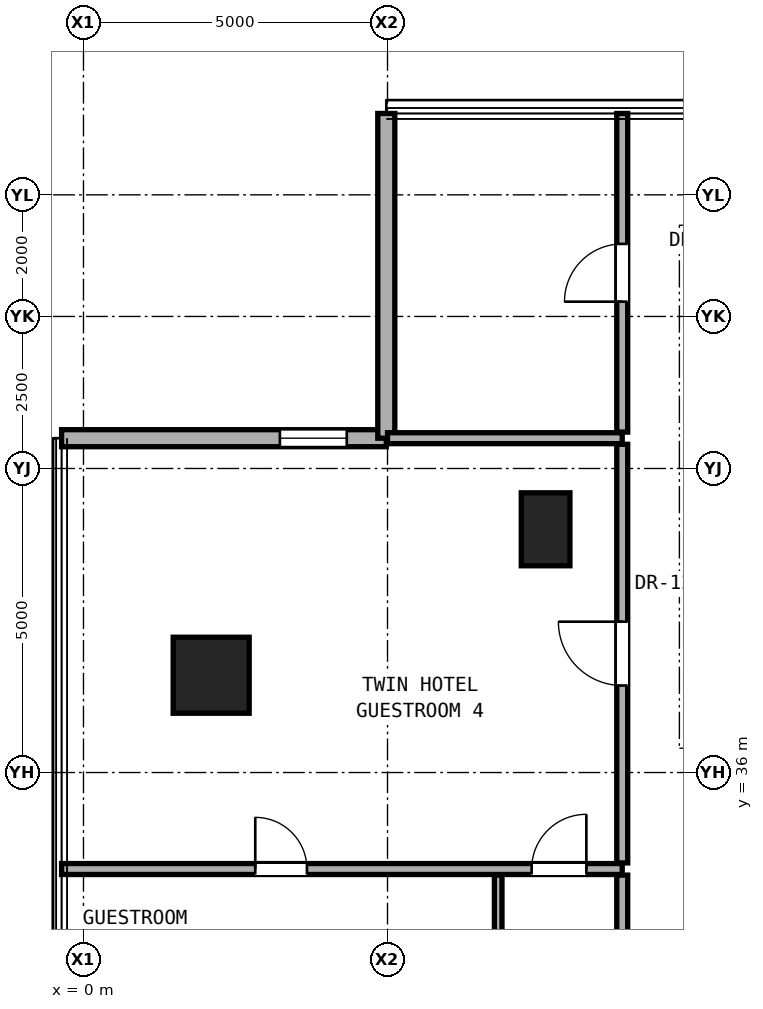
"""IFC4 building model, lengths in metres.
Left out: names, types, materials, properties, quantities, classifications, styles, units other than length and angle.
Written with IfcOpenShell. Run it as: python <this file> out.ifc"""

import sys

from ifc_helpers import new_model, si_unit, direction, frame, frame_2d, origin, origin_2d, place, context, subcontext, project, spatial, rectangle, hollow_rectangle, extrude, element, fill, save


model = new_model("IFC4")
c1 = context("Model", 3, precision=1e-05, world=origin(), true_north=direction((0.0, 1.0)))
c2 = subcontext(c1, "Body", "Model", "MODEL_VIEW")
j1 = project(units=[si_unit("LENGTHUNIT", "METRE"), si_unit("PLANEANGLEUNIT", "RADIAN")], contexts=[c1])
p1 = place(None, origin())
s1 = spatial("IfcSite", under=j1, at=p1, CompositionType="ELEMENT")
p2 = place(p1, origin())
s2 = spatial("IfcBuilding", under=s1, at=p2, CompositionType="ELEMENT")
p3 = place(p2, frame((0.0, 0.0, 55.4)))
s3 = spatial("IfcBuildingStorey", under=s2, at=p3, CompositionType="ELEMENT", Elevation=55.4)
p4 = place(p3, frame((2.1, 37.6, 0.0), z_axis=(0.0, 0.0, 1.0), x_axis=(1.0, 0.0, 0.0)))
e1 = element("IfcColumn", 1, at=p4, inside=s3, PredefinedType="COLUMN", context=c2, shape_type="SweptSolid", body=[
    extrude(hollow_rectangle(XDim=1.25, YDim=1.25, WallThickness=0.07, at=origin_2d()), origin(), (0.0, 0.0, 1.0), 3.3),
])
p5 = place(p3, frame((7.6, 40.0, 0.0), z_axis=(0.0, 0.0, 1.0), x_axis=(1.0, 0.0, 0.0)))
e2 = element("IfcColumn", 2, at=p5, inside=s3, PredefinedType="PILASTER", context=c2, shape_type="SweptSolid", body=[
    extrude(rectangle(XDim=0.8, YDim=1.2, at=origin_2d()), origin(), (0.0, 0.0, 1.0), 3.3),
])
p6 = place(p3, frame((4.98, 41.498, 0.0), z_axis=(0.0, 0.0, 1.0), x_axis=(-1.0, 0.0, 0.0)))
e3 = element("IfcWall", 3, at=p6, inside=s3, PredefinedType="SOLIDWALL", context=c2, shape_type="SweptSolid", body=[
    extrude(rectangle(XDim=5.34, YDim=0.28, at=frame_2d((2.67, 0.0))), origin(), (0.0, 0.0, 1.0), 3.04),
])
p7 = place(p6, frame((0.65, 0.0, 0.85)))
e4 = element("IfcOpeningElement", 4, at=p7, cuts=e3, PredefinedType="OPENING", context=c2, shape_type="SweptSolid", body=[
    extrude(rectangle(XDim=1.1, YDim=2.0, at=frame_2d((0.55, 1.0))), frame((0.0, 0.15, 0.0), z_axis=(0.0, -1.0, 0.0), x_axis=(1.0, 0.0, 0.0)), (0.0, 0.0, 1.0), 0.3),
])
p8 = place(p3, frame((4.98, 46.838, 0.0), z_axis=(0.0, 0.0, 1.0), x_axis=(0.0, -1.0, 0.0)))
e5 = element("IfcWall", 5, at=p8, inside=s3, PredefinedType="SOLIDWALL", context=c2, shape_type="SweptSolid", body=[
    extrude(rectangle(XDim=5.34, YDim=0.28, at=frame_2d((2.67, 0.0))), origin(), (0.0, 0.0, 1.0), 3.04),
])
p9 = place(p3, frame((-0.36, 34.413, 0.0), z_axis=(0.0, 0.0, 1.0), x_axis=(1.0, 0.0, 0.0)))
e6 = element("IfcWall", 6, at=p9, inside=s3, PredefinedType="PARTITIONING", context=c2, shape_type="SweptSolid", body=[
    extrude(rectangle(XDim=9.22, YDim=0.18, at=frame_2d((4.61, 0.0))), origin(), (0.0, 0.0, 1.0), 2.125),
])
p10 = place(p9, frame((3.185, 0.0, 0.0)))
e7 = element("IfcOpeningElement", 7, at=p10, cuts=e6, PredefinedType="OPENING", context=c2, shape_type="SweptSolid", body=[
    extrude(rectangle(XDim=0.85, YDim=2.01, at=frame_2d((0.425, 1.005))), frame((0.0, 0.1, 0.0), z_axis=(0.0, -1.0, 0.0), x_axis=(1.0, 0.0, 0.0)), (0.0, 0.0, 1.0), 0.2),
])
p11 = place(p9, frame((7.73, 0.0, 0.0)))
e8 = element("IfcOpeningElement", 8, at=p11, cuts=e6, PredefinedType="OPENING", context=c2, shape_type="SweptSolid", body=[
    extrude(rectangle(XDim=0.9, YDim=2.1, at=frame_2d((0.45, 1.05))), frame((0.0, 0.1, 0.0), z_axis=(0.0, -1.0, 0.0), x_axis=(1.0, 0.0, 0.0)), (0.0, 0.0, 1.0), 0.2),
])
p12 = place(p3, frame((5.0, 41.498, 0.0), z_axis=(0.0, 0.0, 1.0), x_axis=(1.0, 0.0, 0.0)))
e9 = element("IfcWall", 9, at=p12, inside=s3, PredefinedType="PARTITIONING", context=c2, shape_type="SweptSolid", body=[
    extrude(rectangle(XDim=3.86, YDim=0.18, at=frame_2d((1.93, 0.0))), origin(), (0.0, 0.0, 1.0), 3.06),
])
p13 = place(p3, frame((6.82, 32.213, 0.0), z_axis=(0.0, 0.0, 1.0), x_axis=(0.0, 1.0, 0.0)))
e10 = element("IfcWall", 10, at=p13, inside=s3, PredefinedType="PARTITIONING", context=c2, shape_type="SweptSolid", body=[
    extrude(rectangle(XDim=2.1, YDim=0.125, at=frame_2d((1.05, 0.0))), origin(), (0.0, 0.0, 1.0), 3.06),
])
p14 = place(p3, frame((8.86, 32.213, 0.0), z_axis=(0.0, 0.0, 1.0), x_axis=(0.0, 1.0, 0.0)))
e11 = element("IfcWall", 11, at=p14, inside=s3, PredefinedType="PARTITIONING", context=c2, shape_type="SweptSolid", body=[
    extrude(rectangle(XDim=2.1, YDim=0.18, at=frame_2d((1.05, 0.0))), origin(), (0.0, 0.0, 1.0), 3.06),
])
p15 = place(p3, frame((8.86, 34.513, 0.0), z_axis=(0.0, 0.0, 1.0), x_axis=(0.0, 1.0, 0.0)))
e12 = element("IfcWall", 12, at=p15, inside=s3, PredefinedType="PARTITIONING", context=c2, shape_type="SweptSolid", body=[
    extrude(rectangle(XDim=6.885, YDim=0.18, at=frame_2d((3.442, 0.0))), origin(), (0.0, 0.0, 1.0), 2.436),
])
p16 = place(p15, frame((2.917, 0.0, 0.0)))
e13 = element("IfcOpeningElement", 13, at=p16, cuts=e12, PredefinedType="OPENING", context=c2, shape_type="SweptSolid", body=[
    extrude(rectangle(XDim=1.05, YDim=2.2, at=frame_2d((0.525, 1.1))), frame((0.0, 0.1, 0.0), z_axis=(0.0, -1.0, 0.0), x_axis=(1.0, 0.0, 0.0)), (0.0, 0.0, 1.0), 0.2),
])
p17 = place(p3, frame((8.86, 41.598, 0.0), z_axis=(0.0, 0.0, 1.0), x_axis=(0.0, 1.0, 0.0)))
e14 = element("IfcWall", 14, at=p17, inside=s3, PredefinedType="PARTITIONING", context=c2, shape_type="SweptSolid", body=[
    extrude(rectangle(XDim=5.24, YDim=0.18, at=frame_2d((2.62, 0.0))), origin(), (0.0, 0.0, 1.0), 3.06),
])
p18 = place(p17, frame((2.145, 0.0, 0.0)))
e15 = element("IfcOpeningElement", 15, at=p18, cuts=e14, PredefinedType="OPENING", context=c2, shape_type="SweptSolid", body=[
    extrude(rectangle(XDim=0.95, YDim=2.15, at=frame_2d((0.475, 1.075))), frame((0.0, 0.1, 0.0), z_axis=(0.0, -1.0, 0.0), x_axis=(1.0, 0.0, 0.0)), (0.0, 0.0, 1.0), 0.2),
])
p19 = place(p7, origin())
e16 = element("IfcWindow", 16, at=p19, inside=s3, PartitioningType="SINGLE_PANEL", PredefinedType="WINDOW", context=c2, shape_type="SweptSolid", body=[
    extrude(rectangle(XDim=1.1, YDim=2.0, at=frame_2d((0.55, 1.0))), frame((0.0, 0.03, 0.0), z_axis=(0.0, -1.0, 0.0), x_axis=(1.0, 0.0, 0.0)), (0.0, 0.0, 1.0), 0.06),
])
fill(e4, e16)
p20 = place(p16, origin())
e17 = element("IfcDoor", 17, at=p20, inside=s3, OperationType="SINGLE_SWING_RIGHT", PredefinedType="DOOR", context=c2, shape_type="SweptSolid", body=[
    extrude(rectangle(XDim=1.05, YDim=2.2, at=frame_2d((0.525, 1.1))), frame((0.0, 0.025, 0.0), z_axis=(0.0, -1.0, 0.0), x_axis=(1.0, 0.0, 0.0)), (0.0, 0.0, 1.0), 0.05),
])
fill(e13, e17)
p21 = place(p10, origin())
e18 = element("IfcDoor", 18, at=p21, inside=s3, OperationType="SINGLE_SWING_LEFT", PredefinedType="DOOR", context=c2, shape_type="SweptSolid", body=[
    extrude(rectangle(XDim=0.85, YDim=2.01, at=frame_2d((0.425, 1.005))), frame((0.0, 0.025, 0.0), z_axis=(0.0, -1.0, 0.0), x_axis=(1.0, 0.0, 0.0)), (0.0, 0.0, 1.0), 0.05),
])
fill(e7, e18)
p22 = place(p11, origin())
e19 = element("IfcDoor", 19, at=p22, inside=s3, OperationType="SINGLE_SWING_RIGHT", PredefinedType="DOOR", context=c2, shape_type="SweptSolid", body=[
    extrude(rectangle(XDim=0.9, YDim=2.1, at=frame_2d((0.45, 1.05))), frame((0.0, 0.025, 0.0), z_axis=(0.0, -1.0, 0.0), x_axis=(1.0, 0.0, 0.0)), (0.0, 0.0, 1.0), 0.05),
])
fill(e8, e19)
p23 = place(p18, origin())
e20 = element("IfcDoor", 20, at=p23, inside=s3, OperationType="SINGLE_SWING_LEFT", PredefinedType="DOOR", context=c2, shape_type="SweptSolid", body=[
    extrude(rectangle(XDim=0.95, YDim=2.15, at=frame_2d((0.475, 1.075))), frame((0.0, 0.025, 0.0), z_axis=(0.0, -1.0, 0.0), x_axis=(1.0, 0.0, 0.0)), (0.0, 0.0, 1.0), 0.05),
])
fill(e15, e20)
save(model, sys.argv[1])
